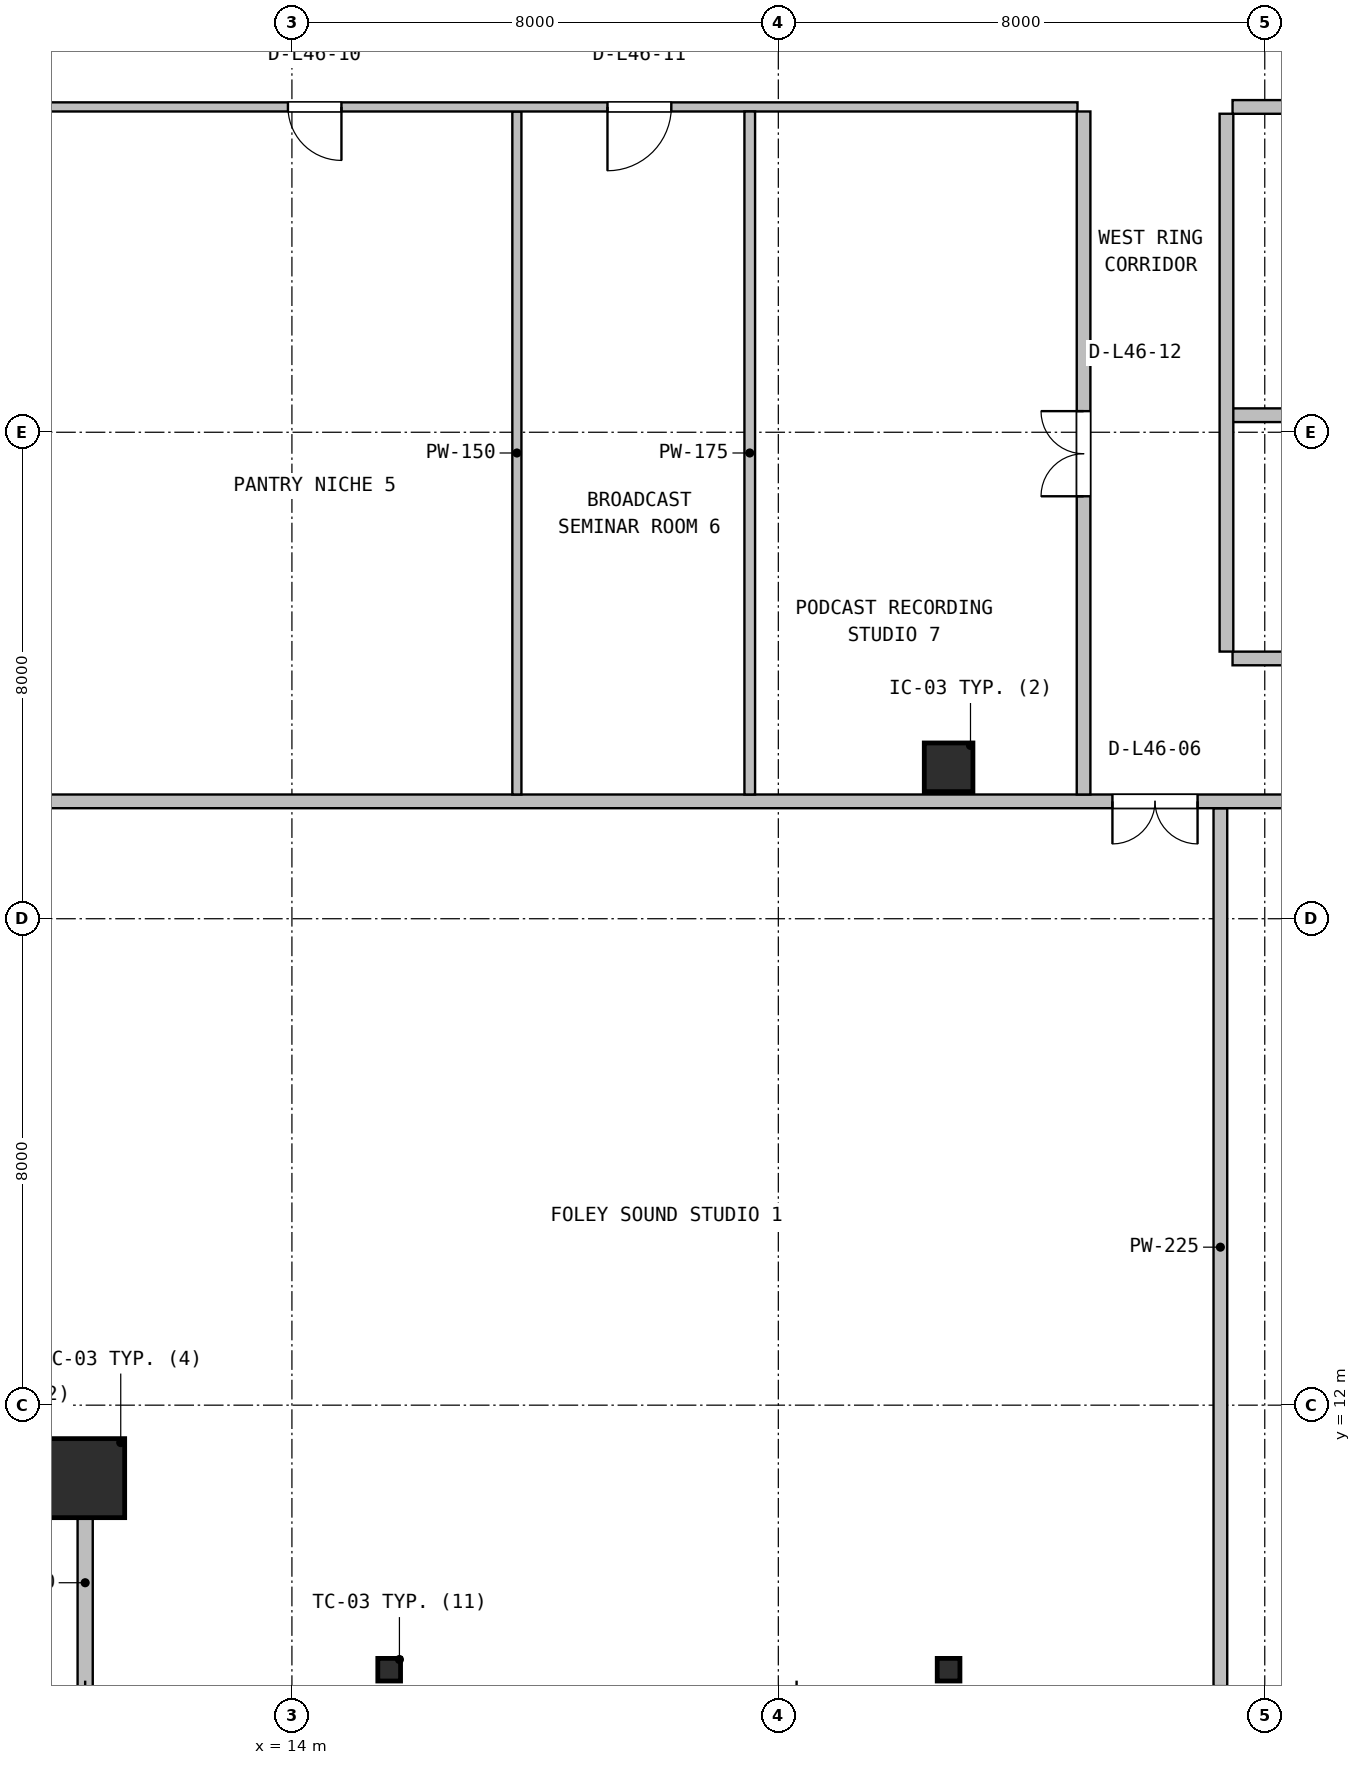
"""IFC4 building model, lengths in metres.
Left out: names, types, materials, properties, quantities, classifications, styles, units other than length and angle.
Written with IfcOpenShell. Run it as: python <this file> out.ifc"""

import sys

from ifc_helpers import new_model, si_unit, direction, frame, frame_2d, origin, origin_2d, place, context, subcontext, project, spatial, rectangle, hollow_rectangle, i_section, extrude, source, transform, mapped, element, fill, save


model = new_model("IFC4")
c1 = context("Model", 3, precision=1e-05, world=origin(), true_north=direction((0.0, 1.0)))
c2 = subcontext(c1, "Body", "Model", "MODEL_VIEW")
j1 = project(units=[si_unit("LENGTHUNIT", "METRE"), si_unit("PLANEANGLEUNIT", "RADIAN")], contexts=[c1])
p1 = place(None, origin())
s1 = spatial("IfcSite", under=j1, at=p1, CompositionType="ELEMENT")
p2 = place(p1, origin())
s2 = spatial("IfcBuilding", under=s1, at=p2, CompositionType="ELEMENT")
p3 = place(p2, frame((0.0, 0.0, 187.6)))
s3 = spatial("IfcBuildingStorey", under=s2, at=p3, CompositionType="ELEMENT", Elevation=187.6)
m1 = source(origin(), c2, "Body", "SweptSolid", [
    extrude(hollow_rectangle(XDim=1.3, YDim=1.3, WallThickness=0.05, at=origin_2d()), origin(), (0.0, 0.0, 1.0), 3.8),
])
p4 = place(p3, frame((10.6, 10.8, 0.0), z_axis=(0.0, 0.0, 1.0), x_axis=(1.0, 0.0, 0.0)))
e1 = element("IfcColumn", 1, at=p4, inside=s3, PredefinedType="COLUMN", context=c2, shape_type="MappedRepresentation", body=[
    mapped(m1, transform((0.0, 0.0, 0.0), x_axis=(1.0, 0.0, 0.0), y_axis=(0.0, 1.0, 0.0), z_axis=(0.0, 0.0, 1.0), scale=1.0)),
])
m2 = source(origin(), c2, "Body", "SweptSolid", [
    extrude(i_section(OverallWidth=0.374, OverallDepth=0.372, WebThickness=0.016, FlangeThickness=0.026, FilletRadius=0.016, at=origin_2d()), origin(), (0.0, 0.0, 1.0), 3.8),
])
for number, where, z_axis, x_axis in (
    (2, (15.6, 7.65, 0.0), (0.0, 0.0, 1.0), (1.0, 0.0, 0.0)),
    (3, (24.8, 7.65, 0.0), (0.0, 0.0, 1.0), (1.0, 0.0, 0.0)),
):
    element("IfcColumn", number, at=place(p3, frame(where, z_axis=z_axis, x_axis=x_axis)), inside=s3, PredefinedType="COLUMN", context=c2, shape_type="MappedRepresentation", body=[
        mapped(m2, transform((0.0, 0.0, 0.0), x_axis=(1.0, 0.0, 0.0), y_axis=(0.0, 1.0, 0.0), z_axis=(0.0, 0.0, 1.0), scale=1.0)),
    ])
m3 = source(origin(), c2, "Body", "SweptSolid", [
    extrude(rectangle(XDim=0.8, YDim=0.8, at=origin_2d()), origin(), (0.0, 0.0, 1.0), 3.8),
])
p5 = place(p3, frame((24.8, 22.49, 0.0), z_axis=(0.0, 0.0, 1.0), x_axis=(1.0, 0.0, 0.0)))
e4 = element("IfcColumn", 4, at=p5, inside=s3, PredefinedType="COLUMN", context=c2, shape_type="MappedRepresentation", body=[
    mapped(m3, transform((0.0, 0.0, 0.0), x_axis=(1.0, 0.0, 0.0), y_axis=(0.0, 1.0, 0.0), z_axis=(0.0, 0.0, 1.0), scale=1.0)),
])
p6 = place(p3, frame((10.6, 7.28, 0.0), z_axis=(0.0, 0.0, 1.0), x_axis=(0.0, 1.0, 0.0)))
e5 = element("IfcWall", 5, at=p6, inside=s3, PredefinedType="SOLIDWALL", context=c2, shape_type="SweptSolid", body=[
    extrude(rectangle(XDim=3.6, YDim=0.25, at=frame_2d((1.8, 0.0))), origin(), (0.0, 0.0, 1.0), 3.078),
])
p7 = place(p3, frame((29.27, 7.38, 0.0), z_axis=(0.0, 0.0, 1.0), x_axis=(0.0, 1.0, 0.0)))
e6 = element("IfcWall", 6, at=p7, inside=s3, PredefinedType="PARTITIONING", context=c2, shape_type="SweptSolid", body=[
    extrude(rectangle(XDim=14.437, YDim=0.225, at=frame_2d((7.219, 0.0))), origin(), (0.0, 0.0, 1.0), 3.078),
])
p8 = place(p3, frame((7.18, 21.93, 0.0), z_axis=(0.0, 0.0, 1.0), x_axis=(1.0, 0.0, 0.0)))
e7 = element("IfcWall", 7, at=p8, inside=s3, PredefinedType="PARTITIONING", context=c2, shape_type="SweptSolid", body=[
    extrude(rectangle(XDim=53.64, YDim=0.225, at=frame_2d((26.82, 0.0))), origin(), (0.0, 0.0, 1.0), 2.879),
])
p9 = place(p8, frame((20.315, 0.0, 0.0)))
e8 = element("IfcOpeningElement", 8, at=p9, cuts=e7, PredefinedType="OPENING", context=c2, shape_type="SweptSolid", body=[
    extrude(rectangle(XDim=1.4, YDim=2.12, at=frame_2d((0.7, 1.06))), frame((0.0, 0.123, 0.0), z_axis=(0.0, -1.0, 0.0), x_axis=(1.0, 0.0, 0.0)), (0.0, 0.0, 1.0), 0.245),
])
p10 = place(p8, frame((27.03, 0.0, 0.0)))
e9 = element("IfcOpeningElement", 9, at=p10, cuts=e7, PredefinedType="OPENING", context=c2, shape_type="SweptSolid", body=[
    extrude(rectangle(XDim=1.4, YDim=2.12, at=frame_2d((0.7, 1.06))), frame((0.0, 0.123, 0.0), z_axis=(0.0, -1.0, 0.0), x_axis=(1.0, 0.0, 0.0)), (0.0, 0.0, 1.0), 0.245),
])
p11 = place(p8, frame((34.245, 0.0, 0.0)))
e10 = element("IfcOpeningElement", 10, at=p11, cuts=e7, PredefinedType="OPENING", context=c2, shape_type="SweptSolid", body=[
    extrude(rectangle(XDim=0.92, YDim=2.08, at=frame_2d((0.46, 1.04))), frame((0.0, 0.123, 0.0), z_axis=(0.0, -1.0, 0.0), x_axis=(1.0, 0.0, 0.0)), (0.0, 0.0, 1.0), 0.245),
])
p12 = place(p8, frame((39.455, 0.0, 0.0)))
e11 = element("IfcOpeningElement", 11, at=p12, cuts=e7, PredefinedType="OPENING", context=c2, shape_type="SweptSolid", body=[
    extrude(rectangle(XDim=1.0, YDim=2.1, at=frame_2d((0.5, 1.05))), frame((0.0, 0.123, 0.0), z_axis=(0.0, -1.0, 0.0), x_axis=(1.0, 0.0, 0.0)), (0.0, 0.0, 1.0), 0.245),
])
p13 = place(p3, frame((17.7, 22.043, 0.0), z_axis=(0.0, 0.0, 1.0), x_axis=(0.0, 1.0, 0.0)))
e12 = element("IfcWall", 12, at=p13, inside=s3, PredefinedType="PARTITIONING", context=c2, shape_type="SweptSolid", body=[
    extrude(rectangle(XDim=11.232, YDim=0.15, at=frame_2d((5.616, 0.0))), origin(), (0.0, 0.0, 1.0), 3.192),
])
p14 = place(p3, frame((7.18, 33.35, 0.0), z_axis=(0.0, 0.0, 1.0), x_axis=(1.0, 0.0, 0.0)))
e13 = element("IfcWall", 13, at=p14, inside=s3, PredefinedType="PARTITIONING", context=c2, shape_type="SweptSolid", body=[
    extrude(rectangle(XDim=19.74, YDim=0.15, at=frame_2d((9.87, 0.0))), origin(), (0.0, 0.0, 1.0), 2.879),
])
p15 = place(p14, frame((6.755, 0.0, 0.0)))
e14 = element("IfcOpeningElement", 14, at=p15, cuts=e13, PredefinedType="OPENING", context=c2, shape_type="SweptSolid", body=[
    extrude(rectangle(XDim=0.88, YDim=2.06, at=frame_2d((0.44, 1.03))), frame((0.0, 0.085, 0.0), z_axis=(0.0, -1.0, 0.0), x_axis=(1.0, 0.0, 0.0)), (0.0, 0.0, 1.0), 0.17),
])
p16 = place(p14, frame((12.01, 0.0, 0.0)))
e15 = element("IfcOpeningElement", 15, at=p16, cuts=e13, PredefinedType="OPENING", context=c2, shape_type="SweptSolid", body=[
    extrude(rectangle(XDim=1.05, YDim=2.1, at=frame_2d((0.525, 1.05))), frame((0.0, 0.085, 0.0), z_axis=(0.0, -1.0, 0.0), x_axis=(1.0, 0.0, 0.0)), (0.0, 0.0, 1.0), 0.17),
])
p17 = place(p3, frame((21.53, 22.043, 0.0), z_axis=(0.0, 0.0, 1.0), x_axis=(0.0, 1.0, 0.0)))
e16 = element("IfcWall", 16, at=p17, inside=s3, PredefinedType="PARTITIONING", context=c2, shape_type="SweptSolid", body=[
    extrude(rectangle(XDim=11.232, YDim=0.175, at=frame_2d((5.616, 0.0))), origin(), (0.0, 0.0, 1.0), 3.192),
])
p18 = place(p3, frame((27.02, 22.043, 0.0), z_axis=(0.0, 0.0, 1.0), x_axis=(0.0, 1.0, 0.0)))
e17 = element("IfcWall", 17, at=p18, inside=s3, PredefinedType="PARTITIONING", context=c2, shape_type="SweptSolid", body=[
    extrude(rectangle(XDim=11.232, YDim=0.225, at=frame_2d((5.616, 0.0))), origin(), (0.0, 0.0, 1.0), 2.879),
])
p19 = place(p18, frame((4.904, 0.0, 0.0)))
e18 = element("IfcOpeningElement", 18, at=p19, cuts=e17, PredefinedType="OPENING", context=c2, shape_type="SweptSolid", body=[
    extrude(rectangle(XDim=1.4, YDim=2.12, at=frame_2d((0.7, 1.06))), frame((0.0, 0.123, 0.0), z_axis=(0.0, -1.0, 0.0), x_axis=(1.0, 0.0, 0.0)), (0.0, 0.0, 1.0), 0.245),
])
p20 = place(p3, frame((29.47, 24.28, 0.0), z_axis=(0.0, 0.0, 1.0), x_axis=(1.0, 0.0, 0.0)))
e19 = element("IfcWall", 19, at=p20, inside=s3, PredefinedType="PARTITIONING", context=c2, shape_type="SweptSolid", body=[
    extrude(rectangle(XDim=16.39, YDim=0.225, at=frame_2d((8.195, 0.0))), origin(), (0.0, 0.0, 1.0), 2.879),
])
p21 = place(p20, frame((7.495, 0.0, 0.0)))
e20 = element("IfcOpeningElement", 20, at=p21, cuts=e19, PredefinedType="OPENING", context=c2, shape_type="SweptSolid", body=[
    extrude(rectangle(XDim=1.4, YDim=2.12, at=frame_2d((0.7, 1.06))), frame((0.0, 0.123, 0.0), z_axis=(0.0, -1.0, 0.0), x_axis=(1.0, 0.0, 0.0)), (0.0, 0.0, 1.0), 0.245),
])
p22 = place(p3, frame((29.47, 28.28, 0.0), z_axis=(0.0, 0.0, 1.0), x_axis=(1.0, 0.0, 0.0)))
e21 = element("IfcWall", 21, at=p22, inside=s3, PredefinedType="PARTITIONING", context=c2, shape_type="SweptSolid", body=[
    extrude(rectangle(XDim=16.39, YDim=0.225, at=frame_2d((8.195, 0.0))), origin(), (0.0, 0.0, 1.0), 2.879),
])
p23 = place(p3, frame((29.37, 24.393, 0.0), z_axis=(0.0, 0.0, 1.0), x_axis=(0.0, 1.0, 0.0)))
e22 = element("IfcWall", 22, at=p23, inside=s3, PredefinedType="PARTITIONING", context=c2, shape_type="SweptSolid", body=[
    extrude(rectangle(XDim=8.845, YDim=0.225, at=frame_2d((4.422, 0.0))), origin(), (0.0, 0.0, 1.0), 3.192),
])
p24 = place(p3, frame((29.47, 33.35, 0.0), z_axis=(0.0, 0.0, 1.0), x_axis=(1.0, 0.0, 0.0)))
e23 = element("IfcWall", 23, at=p24, inside=s3, PredefinedType="PARTITIONING", context=c2, shape_type="SweptSolid", body=[
    extrude(rectangle(XDim=16.39, YDim=0.225, at=frame_2d((8.195, 0.0))), origin(), (0.0, 0.0, 1.0), 2.879),
])
p25 = place(p24, frame((7.495, 0.0, 0.0)))
e24 = element("IfcOpeningElement", 24, at=p25, cuts=e23, PredefinedType="OPENING", context=c2, shape_type="SweptSolid", body=[
    extrude(rectangle(XDim=1.4, YDim=2.12, at=frame_2d((0.7, 1.06))), frame((0.0, 0.123, 0.0), z_axis=(0.0, -1.0, 0.0), x_axis=(1.0, 0.0, 0.0)), (0.0, 0.0, 1.0), 0.245),
])
m4 = source(origin(), c2, "Body", "SweptSolid", [
    extrude(rectangle(XDim=1.4, YDim=2.12, at=frame_2d((0.7, 1.06))), frame((0.0, 0.025, 0.0), z_axis=(0.0, -1.0, 0.0), x_axis=(1.0, 0.0, 0.0)), (0.0, 0.0, 1.0), 0.05),
])
p26 = place(p9, frame((1.4, 0.0, 0.0), z_axis=(0.0, 0.0, 1.0), x_axis=(-1.0, 0.0, 0.0)))
e25 = element("IfcDoor", 25, at=p26, inside=s3, OperationType="DOUBLE_DOOR_SINGLE_SWING", PredefinedType="DOOR", context=c2, shape_type="MappedRepresentation", body=[
    mapped(m4, transform((0.0, 0.0, 0.0), x_axis=(1.0, 0.0, 0.0), y_axis=(0.0, 1.0, 0.0), z_axis=(0.0, 0.0, 1.0), scale=1.0)),
])
fill(e8, e25)
m5 = source(origin(), c2, "Body", "SweptSolid", [
    extrude(rectangle(XDim=0.88, YDim=2.06, at=frame_2d((0.44, 1.03))), frame((0.0, 0.025, 0.0), z_axis=(0.0, -1.0, 0.0), x_axis=(1.0, 0.0, 0.0)), (0.0, 0.0, 1.0), 0.05),
])
p27 = place(p15, frame((0.88, 0.0, 0.0), z_axis=(0.0, 0.0, 1.0), x_axis=(-1.0, 0.0, 0.0)))
e26 = element("IfcDoor", 26, at=p27, inside=s3, OperationType="SINGLE_SWING_RIGHT", PredefinedType="DOOR", context=c2, shape_type="MappedRepresentation", body=[
    mapped(m5, transform((0.0, 0.0, 0.0), x_axis=(1.0, 0.0, 0.0), y_axis=(0.0, 1.0, 0.0), z_axis=(0.0, 0.0, 1.0), scale=1.0)),
])
fill(e14, e26)
m6 = source(origin(), c2, "Body", "SweptSolid", [
    extrude(rectangle(XDim=1.05, YDim=2.1, at=frame_2d((0.525, 1.05))), frame((0.0, 0.025, 0.0), z_axis=(0.0, -1.0, 0.0), x_axis=(1.0, 0.0, 0.0)), (0.0, 0.0, 1.0), 0.05),
])
p28 = place(p16, frame((1.05, 0.0, 0.0), z_axis=(0.0, 0.0, 1.0), x_axis=(-1.0, 0.0, 0.0)))
e27 = element("IfcDoor", 27, at=p28, inside=s3, OperationType="SINGLE_SWING_LEFT", PredefinedType="DOOR", context=c2, shape_type="MappedRepresentation", body=[
    mapped(m6, transform((0.0, 0.0, 0.0), x_axis=(1.0, 0.0, 0.0), y_axis=(0.0, 1.0, 0.0), z_axis=(0.0, 0.0, 1.0), scale=1.0)),
])
fill(e15, e27)
p29 = place(p19, origin())
e28 = element("IfcDoor", 28, at=p29, inside=s3, OperationType="DOUBLE_DOOR_SINGLE_SWING", PredefinedType="DOOR", context=c2, shape_type="MappedRepresentation", body=[
    mapped(m4, transform((0.0, 0.0, 0.0), x_axis=(1.0, 0.0, 0.0), y_axis=(0.0, 1.0, 0.0), z_axis=(0.0, 0.0, 1.0), scale=1.0)),
])
fill(e18, e28)
save(model, sys.argv[1])
